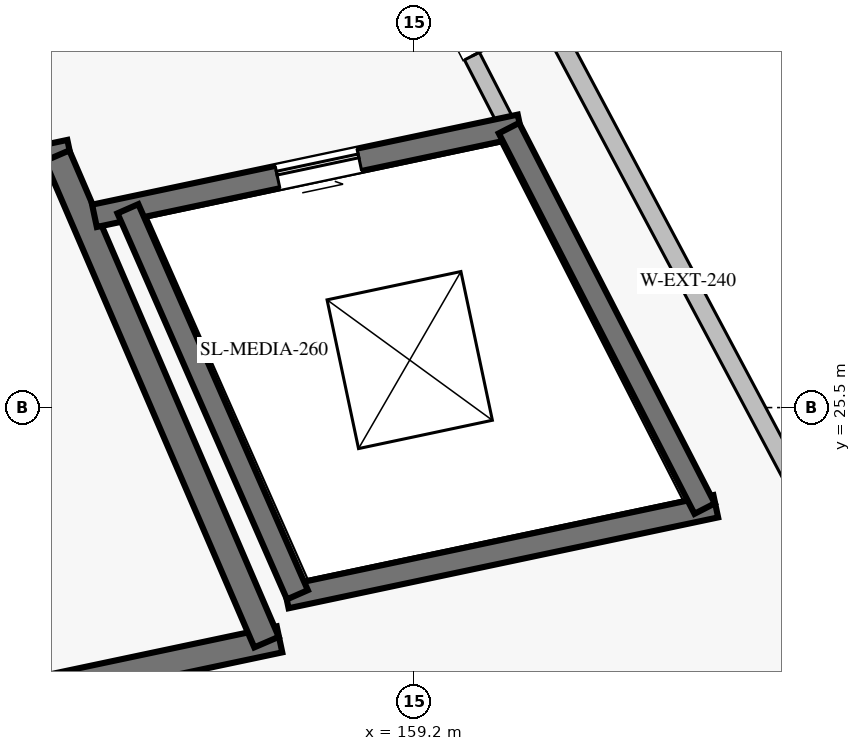
"""IFC4 building model, lengths in metres.
Left out: names, types, materials, properties, quantities, classifications, styles, units other than length and angle.
Written with IfcOpenShell. Run it as: python <this file> out.ifc"""

import sys

from ifc_helpers import new_model, si_unit, direction, frame, frame_2d, origin, place, context, subcontext, project, spatial, rectangle, extrude, element, fill, save


model = new_model("IFC4")
c1 = context("Model", 3, precision=1e-05, world=origin(), true_north=direction((0.0, 1.0)))
c2 = subcontext(c1, "Body", "Model", "MODEL_VIEW")
j1 = project(units=[si_unit("LENGTHUNIT", "METRE"), si_unit("PLANEANGLEUNIT", "RADIAN")], contexts=[c1])
p1 = place(None, origin())
s1 = spatial("IfcSite", under=j1, at=p1, CompositionType="ELEMENT")
p2 = place(p1, origin())
s2 = spatial("IfcBuilding", under=s1, at=p2, CompositionType="ELEMENT")
p3 = place(p2, frame((0.0, 0.0, 31.28)))
s3 = spatial("IfcBuildingStorey", under=s2, at=p3, CompositionType="ELEMENT", Elevation=31.28)
p4 = place(p3, frame((159.915, 32.606, 0.0), z_axis=(0.0, 0.0, 1.0), x_axis=(0.469662269939, -0.882846165646, 0.0)))
e1 = element("IfcWall", 1, at=p4, inside=s3, PredefinedType="SOLIDWALL", context=c2, shape_type="SweptSolid", body=[
    extrude(rectangle(XDim=12.32, YDim=0.24, at=frame_2d((6.16, 0.0))), origin(), (0.0, 0.0, 1.0), 4.458),
])
p5 = place(p3, frame((142.896, 26.357, 0.0), z_axis=(0.0, 0.0, 1.0), x_axis=(0.978345203961, 0.206979858648, 0.0)))
e2 = element("IfcWall", 2, at=p5, inside=s3, PredefinedType="SHEAR", context=c2, shape_type="SweptSolid", body=[
    extrude(rectangle(XDim=12.044, YDim=0.35, at=frame_2d((6.022, 0.0))), origin(), (0.0, 0.0, 1.0), 5.16),
])
p6 = place(p5, frame((0.475, 0.0, 0.0)))
e3 = element("IfcOpeningElement", 3, at=p6, cuts=e2, PredefinedType="OPENING", context=c2, shape_type="SweptSolid", body=[
    extrude(rectangle(XDim=1.8, YDim=2.2, at=frame_2d((0.9, 1.1))), frame((0.0, 0.185, 0.0), z_axis=(0.0, -1.0, 0.0), x_axis=(1.0, 0.0, 0.0)), (0.0, 0.0, 1.0), 0.37),
])
p7 = place(p3, frame((144.65, 19.746, 0.0), z_axis=(0.0, 0.0, 1.0), x_axis=(0.978345119536, 0.206980257705, 0.0)))
e4 = element("IfcWall", 4, at=p7, inside=s3, PredefinedType="SHEAR", context=c2, shape_type="SweptSolid", body=[
    extrude(rectangle(XDim=13.067, YDim=0.35, at=frame_2d((6.533, 0.0))), origin(), (0.0, 0.0, 1.0), 5.16),
])
p8 = place(p3, frame((154.508, 28.814, 0.0), z_axis=(0.0, 0.0, 1.0), x_axis=(0.395453834155, -0.918485854574, 0.0)))
e5 = element("IfcWall", 5, at=p8, inside=s3, PredefinedType="SHEAR", context=c2, shape_type="SweptSolid", body=[
    extrude(rectangle(XDim=6.968, YDim=0.35, at=frame_2d((3.484, 0.0))), origin(), (0.0, 0.0, 1.0), 5.16),
])
p9 = place(p3, frame((154.999, 28.023, 0.0), z_axis=(0.0, 0.0, 1.0), x_axis=(0.978345218992, 0.206979787601, 0.0)))
e6 = element("IfcWall", 6, at=p9, inside=s3, PredefinedType="SHEAR", context=c2, shape_type="SweptSolid", body=[
    extrude(rectangle(XDim=5.724, YDim=0.3, at=frame_2d((2.862, 0.0))), origin(), (0.0, 0.0, 1.0), 5.16),
])
p10 = place(p9, frame((2.462, 0.0, 0.0)))
e7 = element("IfcOpeningElement", 7, at=p10, cuts=e6, PredefinedType="OPENING", context=c2, shape_type="SweptSolid", body=[
    extrude(rectangle(XDim=1.1, YDim=2.2, at=frame_2d((0.55, 1.1))), frame((0.0, 0.16, 0.0), z_axis=(0.0, -1.0, 0.0), x_axis=(1.0, 0.0, 0.0)), (0.0, 0.0, 1.0), 0.32),
])
p11 = place(p3, frame((157.523, 23.006, 0.0), z_axis=(0.0, 0.0, 1.0), x_axis=(0.978347069901, 0.206971038591, 0.0)))
e8 = element("IfcWall", 8, at=p11, inside=s3, PredefinedType="SHEAR", context=c2, shape_type="SweptSolid", body=[
    extrude(rectangle(XDim=5.776, YDim=0.3, at=frame_2d((2.888, 0.0))), origin(), (0.0, 0.0, 1.0), 5.16),
])
p12 = place(p3, frame((155.44, 28.116, 0.0), z_axis=(0.0, 0.0, 1.0), x_axis=(0.402005363577, -0.915637312289, 0.0)))
e9 = element("IfcWall", 9, at=p12, inside=s3, PredefinedType="SHEAR", context=c2, shape_type="SweptSolid", body=[
    extrude(rectangle(XDim=5.547, YDim=0.3, at=frame_2d((2.773, 0.0))), origin(), (0.0, 0.0, 1.0), 5.16),
])
p13 = place(p3, frame((160.453, 29.177, 0.0), z_axis=(0.0, 0.0, 1.0), x_axis=(0.457368592987, -0.889277217829, 0.0)))
e10 = element("IfcWall", 10, at=p13, inside=s3, PredefinedType="SHEAR", context=c2, shape_type="SweptSolid", body=[
    extrude(rectangle(XDim=5.629, YDim=0.3, at=frame_2d((2.814, 0.0))), origin(), (0.0, 0.0, 1.0), 5.16),
])
p14 = place(p3, frame((142.284, 28.914, 0.0), z_axis=(0.0, 0.0, 1.0), x_axis=(0.97834522483, 0.206979760008, 0.0)))
e11 = element("IfcWall", 11, at=p14, inside=s3, PredefinedType="SOLIDWALL", context=c2, shape_type="SweptSolid", body=[
    extrude(rectangle(XDim=16.983, YDim=0.22, at=frame_2d((8.491, 0.0))), origin(), (0.0, 0.0, 1.0), 5.16),
])
p15 = place(p3, frame((158.792, 32.406, 0.0), z_axis=(0.0, 0.0, 1.0), x_axis=(0.457349531643, -0.889287021105, 0.0)))
e12 = element("IfcWall", 12, at=p15, inside=s3, PredefinedType="SOLIDWALL", context=c2, shape_type="SweptSolid", body=[
    extrude(rectangle(XDim=3.632, YDim=0.22, at=frame_2d((1.816, 0.0))), origin(), (0.0, 0.0, 1.0), 5.16),
])
p16 = place(p15, frame((1.066, 0.0, 0.0)))
e13 = element("IfcOpeningElement", 13, at=p16, cuts=e12, PredefinedType="OPENING", context=c2, shape_type="SweptSolid", body=[
    extrude(rectangle(XDim=1.5, YDim=2.2, at=frame_2d((0.75, 1.1))), frame((0.0, 0.12, 0.0), z_axis=(0.0, -1.0, 0.0), x_axis=(1.0, 0.0, 0.0)), (0.0, 0.0, 1.0), 0.24),
])
p17 = place(p10, origin())
e14 = element("IfcDoor", 14, at=p17, inside=s3, OperationType="SLIDING_TO_RIGHT", PredefinedType="DOOR", context=c2, shape_type="SweptSolid", body=[
    extrude(rectangle(XDim=1.1, YDim=2.2, at=frame_2d((0.55, 1.1))), frame((0.0, 0.025, 0.0), z_axis=(0.0, -1.0, 0.0), x_axis=(1.0, 0.0, 0.0)), (0.0, 0.0, 1.0), 0.05),
])
fill(e7, e14)
p18 = place(p16, origin())
e15 = element("IfcDoor", 15, at=p18, inside=s3, OperationType="DOUBLE_DOOR_SINGLE_SWING", PredefinedType="DOOR", context=c2, shape_type="SweptSolid", body=[
    extrude(rectangle(XDim=1.5, YDim=2.2, at=frame_2d((0.75, 1.1))), frame((0.0, 0.025, 0.0), z_axis=(0.0, -1.0, 0.0), x_axis=(1.0, 0.0, 0.0)), (0.0, 0.0, 1.0), 0.05),
])
fill(e13, e15)
save(model, sys.argv[1])
